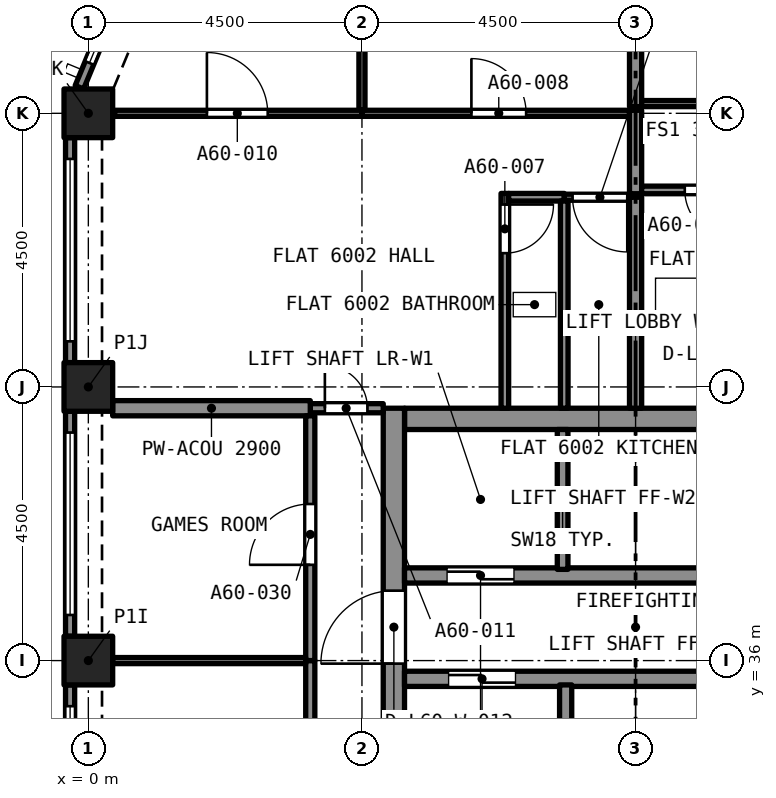
"""IFC4 building model, lengths in metres.
Left out: names, types, materials, properties, quantities, classifications, styles, units other than length and angle.
Written with IfcOpenShell. Run it as: python <this file> out.ifc"""

import sys

from ifc_helpers import new_model, si_unit, direction, frame, frame_2d, origin, origin_2d, place, context, subcontext, project, spatial, rectangle, extrude, element, fill, save


model = new_model("IFC4")
c1 = context("Model", 3, precision=1e-05, world=origin(), true_north=direction((0.0, 1.0)))
c2 = subcontext(c1, "Body", "Model", "MODEL_VIEW")
j1 = project(units=[si_unit("LENGTHUNIT", "METRE"), si_unit("PLANEANGLEUNIT", "RADIAN")], contexts=[c1])
p1 = place(None, origin())
s1 = spatial("IfcSite", under=j1, at=p1, CompositionType="ELEMENT")
p2 = place(p1, origin())
s2 = spatial("IfcBuilding", under=s1, at=p2, CompositionType="ELEMENT")
p3 = place(p2, frame((0.0, 0.0, 216.495)))
s3 = spatial("IfcBuildingStorey", under=s2, at=p3, CompositionType="ELEMENT", Elevation=216.495)
for number, where, z_axis, x_axis in (
    (1, (0.0, 36.0, 0.0), (0.0, 0.0, 1.0), (1.0, 0.0, 0.0)),
    (2, (0.0, 40.5, 0.0), (0.0, 0.0, 1.0), (1.0, 0.0, 0.0)),
    (3, (0.0, 45.0, 0.0), (0.0, 0.0, 1.0), (1.0, 0.0, 0.0)),
):
    element("IfcColumn", number, at=place(p3, frame(where, z_axis=z_axis, x_axis=x_axis)), inside=s3, PredefinedType="COLUMN", context=c2, shape_type="SweptSolid", body=[
        extrude(rectangle(XDim=0.8, YDim=0.8, at=origin_2d()), origin(), (0.0, 0.0, 1.0), 3.2),
    ])
p4 = place(p3, frame((5.2, 39.975, 0.0), z_axis=(0.0, 0.0, 1.0), x_axis=(1.0, 0.0, 0.0)))
e4 = element("IfcWall", 4, at=p4, inside=s3, PredefinedType="SOLIDWALL", context=c2, shape_type="SweptSolid", body=[
    extrude(rectangle(XDim=7.6, YDim=0.35, at=frame_2d((3.8, 0.0))), origin(), (0.0, 0.0, 1.0), 3.2),
])
p5 = place(p3, frame((5.025, 27.35, 0.0), z_axis=(0.0, 0.0, 1.0), x_axis=(0.0, 1.0, 0.0)))
e5 = element("IfcWall", 5, at=p5, inside=s3, PredefinedType="SOLIDWALL", context=c2, shape_type="SweptSolid", body=[
    extrude(rectangle(XDim=12.8, YDim=0.35, at=frame_2d((6.4, 0.0))), origin(), (0.0, 0.0, 1.0), 3.2),
])
p6 = place(p5, frame((8.6, 0.0, 0.0)))
e6 = element("IfcOpeningElement", 6, at=p6, cuts=e5, PredefinedType="OPENING", context=c2, shape_type="SweptSolid", body=[
    extrude(rectangle(XDim=1.2, YDim=2.1, at=frame_2d((0.6, 1.05))), frame((0.0, 0.185, 0.0), z_axis=(0.0, -1.0, 0.0), x_axis=(1.0, 0.0, 0.0)), (0.0, 0.0, 1.0), 0.37),
])
p7 = place(p3, frame((-0.147, 45.429, 0.0), z_axis=(0.0, 0.0, 1.0), x_axis=(0.382669406082, 0.923885342263, 0.0)))
e7 = element("IfcWall", 7, at=p7, inside=s3, PredefinedType="SOLIDWALL", context=c2, shape_type="SweptSolid", body=[
    extrude(rectangle(XDim=2.602, YDim=0.15, at=frame_2d((1.301, 0.0))), origin(), (0.0, 0.0, 1.0), 3.2),
])
p8 = place(p7, frame((0.432, 0.0, 0.45)))
e8 = element("IfcOpeningElement", 8, at=p8, cuts=e7, PredefinedType="OPENING", context=c2, shape_type="SweptSolid", body=[
    extrude(rectangle(XDim=1.9, YDim=1.95, at=frame_2d((0.95, 0.975))), frame((0.0, 0.085, 0.0), z_axis=(0.0, -1.0, 0.0), x_axis=(1.0, 0.0, 0.0)), (0.0, 0.0, 1.0), 0.17),
])
p9 = place(p3, frame((-0.3, 40.9, 0.0), z_axis=(0.0, 0.0, 1.0), x_axis=(0.0, 1.0, 0.0)))
e9 = element("IfcWall", 9, at=p9, inside=s3, PredefinedType="SOLIDWALL", context=c2, shape_type="SweptSolid", body=[
    extrude(rectangle(XDim=3.7, YDim=0.15, at=frame_2d((1.85, 0.0))), origin(), (0.0, 0.0, 1.0), 3.2),
])
p10 = place(p9, frame((0.35, 0.0, 0.45)))
e10 = element("IfcOpeningElement", 10, at=p10, cuts=e9, PredefinedType="OPENING", context=c2, shape_type="SweptSolid", body=[
    extrude(rectangle(XDim=3.0, YDim=1.95, at=frame_2d((1.5, 0.975))), frame((0.0, 0.085, 0.0), z_axis=(0.0, -1.0, 0.0), x_axis=(1.0, 0.0, 0.0)), (0.0, 0.0, 1.0), 0.17),
])
p11 = place(p3, frame((-0.3, 36.4, 0.0), z_axis=(0.0, 0.0, 1.0), x_axis=(0.0, 1.0, 0.0)))
e11 = element("IfcWall", 11, at=p11, inside=s3, PredefinedType="SOLIDWALL", context=c2, shape_type="SweptSolid", body=[
    extrude(rectangle(XDim=3.7, YDim=0.15, at=frame_2d((1.85, 0.0))), origin(), (0.0, 0.0, 1.0), 3.2),
])
p12 = place(p11, frame((0.35, 0.0, 0.45)))
e12 = element("IfcOpeningElement", 12, at=p12, cuts=e11, PredefinedType="OPENING", context=c2, shape_type="SweptSolid", body=[
    extrude(rectangle(XDim=3.0, YDim=1.95, at=frame_2d((1.5, 0.975))), frame((0.0, 0.085, 0.0), z_axis=(0.0, -1.0, 0.0), x_axis=(1.0, 0.0, 0.0)), (0.0, 0.0, 1.0), 0.17),
])
p13 = place(p3, frame((-0.3, 31.9, 0.0), z_axis=(0.0, 0.0, 1.0), x_axis=(0.0, 1.0, 0.0)))
e13 = element("IfcWall", 13, at=p13, inside=s3, PredefinedType="SOLIDWALL", context=c2, shape_type="SweptSolid", body=[
    extrude(rectangle(XDim=3.7, YDim=0.15, at=frame_2d((1.85, 0.0))), origin(), (0.0, 0.0, 1.0), 3.2),
])
p14 = place(p13, frame((0.35, 0.0, 0.45)))
e14 = element("IfcOpeningElement", 14, at=p14, cuts=e13, PredefinedType="OPENING", context=c2, shape_type="SweptSolid", body=[
    extrude(rectangle(XDim=3.0, YDim=1.95, at=frame_2d((1.5, 0.975))), frame((0.0, 0.085, 0.0), z_axis=(0.0, -1.0, 0.0), x_axis=(1.0, 0.0, 0.0)), (0.0, 0.0, 1.0), 0.17),
])
p15 = place(p3, frame((6.85, 43.683, 0.0), z_axis=(0.0, 0.0, 1.0), x_axis=(0.0, -1.0, 0.0)))
e15 = element("IfcWall", 15, at=p15, inside=s3, PredefinedType="PARTITIONING", context=c2, shape_type="SweptSolid", body=[
    extrude(rectangle(XDim=3.533, YDim=0.125, at=frame_2d((1.766, 0.0))), origin(), (0.0, 0.0, 1.0), 2.9),
])
p16 = place(p15, frame((0.183, 0.0, 0.0)))
e16 = element("IfcOpeningElement", 16, at=p16, cuts=e15, PredefinedType="OPENING", context=c2, shape_type="SweptSolid", body=[
    extrude(rectangle(XDim=0.8, YDim=2.1, at=frame_2d((0.4, 1.05))), frame((0.0, 0.073, 0.0), z_axis=(0.0, -1.0, 0.0), x_axis=(1.0, 0.0, 0.0)), (0.0, 0.0, 1.0), 0.145),
])
p17 = place(p3, frame((6.913, 43.62, 0.0), z_axis=(0.0, 0.0, 1.0), x_axis=(1.0, 0.0, 0.0)))
e17 = element("IfcWall", 17, at=p17, inside=s3, PredefinedType="PARTITIONING", context=c2, shape_type="SweptSolid", body=[
    extrude(rectangle(XDim=0.915, YDim=0.125, at=frame_2d((0.458, 0.0))), origin(), (0.0, 0.0, 1.0), 2.9),
])
p18 = place(p3, frame((7.827, 40.15, 0.0), z_axis=(0.0, 0.0, 1.0), x_axis=(0.0, 1.0, 0.0)))
e18 = element("IfcWall", 18, at=p18, inside=s3, PredefinedType="PARTITIONING", context=c2, shape_type="SweptSolid", body=[
    extrude(rectangle(XDim=3.408, YDim=0.125, at=frame_2d((1.704, 0.0))), origin(), (0.0, 0.0, 1.0), 2.9),
])
p19 = place(p3, frame((4.5, 45.0, 0.0), z_axis=(0.0, 0.0, 1.0), x_axis=(1.0, 0.0, 0.0)))
e19 = element("IfcWall", 19, at=p19, inside=s3, PredefinedType="PARTITIONING", context=c2, shape_type="SweptSolid", body=[
    extrude(rectangle(XDim=4.4, YDim=0.1, at=frame_2d((2.2, 0.0))), origin(), (0.0, 0.0, 1.0), 2.9),
])
p20 = place(p19, frame((1.8, 0.0, 0.0)))
e20 = element("IfcOpeningElement", 20, at=p20, cuts=e19, PredefinedType="OPENING", context=c2, shape_type="SweptSolid", body=[
    extrude(rectangle(XDim=0.9, YDim=2.1, at=frame_2d((0.45, 1.05))), frame((0.0, 0.06, 0.0), z_axis=(0.0, -1.0, 0.0), x_axis=(1.0, 0.0, 0.0)), (0.0, 0.0, 1.0), 0.12),
])
p21 = place(p3, frame((4.5, 45.05, 0.0), z_axis=(0.0, 0.0, 1.0), x_axis=(0.0, 1.0, 0.0)))
e21 = element("IfcWall", 21, at=p21, inside=s3, PredefinedType="PARTITIONING", context=c2, shape_type="SweptSolid", body=[
    extrude(rectangle(XDim=4.017, YDim=0.1, at=frame_2d((2.009, 0.0))), origin(), (0.0, 0.0, 1.0), 2.9),
])
p22 = place(p3, frame((9.0, 45.11, 0.0), z_axis=(0.0, 0.0, 1.0), x_axis=(0.0, 1.0, 0.0)))
e22 = element("IfcWall", 22, at=p22, inside=s3, PredefinedType="PARTITIONING", context=c2, shape_type="SweptSolid", body=[
    extrude(rectangle(XDim=3.99, YDim=0.2, at=frame_2d((1.995, 0.0))), origin(), (0.0, 0.0, 1.0), 2.9),
])
p23 = place(p3, frame((9.0, 43.62, 0.0), z_axis=(0.0, 0.0, 1.0), x_axis=(-1.0, 0.0, 0.0)))
e23 = element("IfcWall", 23, at=p23, inside=s3, PredefinedType="PARTITIONING", context=c2, shape_type="SweptSolid", body=[
    extrude(rectangle(XDim=1.173, YDim=0.1, at=frame_2d((0.586, 0.0))), origin(), (0.0, 0.0, 1.0), 2.9),
])
p24 = place(p23, frame((0.136, 0.0, 0.0)))
e24 = element("IfcOpeningElement", 24, at=p24, cuts=e23, PredefinedType="OPENING", context=c2, shape_type="SweptSolid", body=[
    extrude(rectangle(XDim=0.9, YDim=2.1, at=frame_2d((0.45, 1.05))), frame((0.0, 0.06, 0.0), z_axis=(0.0, -1.0, 0.0), x_axis=(1.0, 0.0, 0.0)), (0.0, 0.0, 1.0), 0.12),
])
p25 = place(p3, frame((0.433, 45.0, 0.0), z_axis=(0.0, 0.0, 1.0), x_axis=(1.0, 0.0, 0.0)))
e25 = element("IfcWall", 25, at=p25, inside=s3, PredefinedType="PARTITIONING", context=c2, shape_type="SweptSolid", body=[
    extrude(rectangle(XDim=4.067, YDim=0.1, at=frame_2d((2.034, 0.0))), origin(), (0.0, 0.0, 1.0), 2.9),
])
p26 = place(p25, frame((1.517, 0.0, 0.0)))
e26 = element("IfcOpeningElement", 26, at=p26, cuts=e25, PredefinedType="OPENING", context=c2, shape_type="SweptSolid", body=[
    extrude(rectangle(XDim=1.0, YDim=2.1, at=frame_2d((0.5, 1.05))), frame((0.0, 0.06, 0.0), z_axis=(0.0, -1.0, 0.0), x_axis=(1.0, 0.0, 0.0)), (0.0, 0.0, 1.0), 0.12),
])
p27 = place(p3, frame((9.0, 43.677, 0.0), z_axis=(0.0, 0.0, 1.0), x_axis=(0.0, 1.0, 0.0)))
e27 = element("IfcWall", 27, at=p27, inside=s3, PredefinedType="PARTITIONING", context=c2, shape_type="SweptSolid", body=[
    extrude(rectangle(XDim=1.373, YDim=0.2, at=frame_2d((0.686, 0.0))), origin(), (0.0, 0.0, 1.0), 2.9),
])
p28 = place(p3, frame((3.65, 40.15, 0.0), z_axis=(0.0, 0.0, 1.0), x_axis=(1.0, 0.0, 0.0)))
e28 = element("IfcWall", 28, at=p28, inside=s3, PredefinedType="PARTITIONING", context=c2, shape_type="SweptSolid", body=[
    extrude(rectangle(XDim=1.2, YDim=0.15, at=frame_2d((0.6, 0.0))), origin(), (0.0, 0.0, 1.0), 2.9),
])
p29 = place(p28, frame((0.24, 0.0, 0.0)))
e29 = element("IfcOpeningElement", 29, at=p29, cuts=e28, PredefinedType="OPENING", context=c2, shape_type="SweptSolid", body=[
    extrude(rectangle(XDim=0.7, YDim=2.1, at=frame_2d((0.35, 1.05))), frame((0.0, 0.085, 0.0), z_axis=(0.0, -1.0, 0.0), x_axis=(1.0, 0.0, 0.0)), (0.0, 0.0, 1.0), 0.17),
])
p30 = place(p3, frame((0.4, 40.15, 0.0), z_axis=(0.0, 0.0, 1.0), x_axis=(1.0, 0.0, 0.0)))
e30 = element("IfcWall", 30, at=p30, inside=s3, PredefinedType="PARTITIONING", context=c2, shape_type="SweptSolid", body=[
    extrude(rectangle(XDim=3.25, YDim=0.25, at=frame_2d((1.625, 0.0))), origin(), (0.0, 0.0, 1.0), 2.9),
])
p31 = place(p3, frame((9.0, 40.15, 0.0), z_axis=(0.0, 0.0, 1.0), x_axis=(0.0, 1.0, 0.0)))
e31 = element("IfcWall", 31, at=p31, inside=s3, PredefinedType="PARTITIONING", context=c2, shape_type="SweptSolid", body=[
    extrude(rectangle(XDim=3.47, YDim=0.2, at=frame_2d((1.735, 0.0))), origin(), (0.0, 0.0, 1.0), 2.9),
])
p32 = place(p3, frame((11.418, 43.74, 0.0), z_axis=(0.0, 0.0, 1.0), x_axis=(-1.0, 0.0, 0.0)))
e32 = element("IfcWall", 32, at=p32, inside=s3, PredefinedType="PARTITIONING", context=c2, shape_type="SweptSolid", body=[
    extrude(rectangle(XDim=2.318, YDim=0.125, at=frame_2d((1.159, 0.0))), origin(), (0.0, 0.0, 1.0), 2.9),
])
p33 = place(p32, frame((0.809, 0.0, 0.0)))
e33 = element("IfcOpeningElement", 33, at=p33, cuts=e32, PredefinedType="OPENING", context=c2, shape_type="SweptSolid", body=[
    extrude(rectangle(XDim=0.8, YDim=2.1, at=frame_2d((0.4, 1.05))), frame((0.0, 0.073, 0.0), z_axis=(0.0, -1.0, 0.0), x_axis=(1.0, 0.0, 0.0)), (0.0, 0.0, 1.0), 0.145),
])
p34 = place(p3, frame((9.1, 45.16, 0.0), z_axis=(0.0, 0.0, 1.0), x_axis=(1.0, 0.0, 0.0)))
e34 = element("IfcWall", 34, at=p34, inside=s3, PredefinedType="PARTITIONING", context=c2, shape_type="SweptSolid", body=[
    extrude(rectangle(XDim=4.4, YDim=0.1, at=frame_2d((2.2, 0.0))), origin(), (0.0, 0.0, 1.0), 2.9),
])
p35 = place(p34, frame((1.65, 0.0, 0.0)))
e35 = element("IfcOpeningElement", 35, at=p35, cuts=e34, PredefinedType="OPENING", context=c2, shape_type="SweptSolid", body=[
    extrude(rectangle(XDim=1.0, YDim=2.1, at=frame_2d((0.5, 1.05))), frame((0.0, 0.06, 0.0), z_axis=(0.0, -1.0, 0.0), x_axis=(1.0, 0.0, 0.0)), (0.0, 0.0, 1.0), 0.12),
])
p36 = place(p3, frame((3.65, 31.5, 0.0), z_axis=(0.0, 0.0, 1.0), x_axis=(0.0, 1.0, 0.0)))
e36 = element("IfcWall", 36, at=p36, inside=s3, PredefinedType="PARTITIONING", context=c2, shape_type="SweptSolid", body=[
    extrude(rectangle(XDim=4.5, YDim=0.15, at=frame_2d((2.25, 0.0))), origin(), (0.0, 0.0, 1.0), 2.9),
])
p37 = place(p36, frame((1.75, 0.0, 0.0)))
e37 = element("IfcOpeningElement", 37, at=p37, cuts=e36, PredefinedType="OPENING", context=c2, shape_type="SweptSolid", body=[
    extrude(rectangle(XDim=1.0, YDim=2.1, at=frame_2d((0.5, 1.05))), frame((0.0, 0.085, 0.0), z_axis=(0.0, -1.0, 0.0), x_axis=(1.0, 0.0, 0.0)), (0.0, 0.0, 1.0), 0.17),
])
p38 = place(p3, frame((3.65, 36.0, 0.0), z_axis=(0.0, 0.0, 1.0), x_axis=(0.0, 1.0, 0.0)))
e38 = element("IfcWall", 38, at=p38, inside=s3, PredefinedType="PARTITIONING", context=c2, shape_type="SweptSolid", body=[
    extrude(rectangle(XDim=4.025, YDim=0.15, at=frame_2d((2.012, 0.0))), origin(), (0.0, 0.0, 1.0), 2.9),
])
p39 = place(p38, frame((1.575, 0.0, 0.0)))
e39 = element("IfcOpeningElement", 39, at=p39, cuts=e38, PredefinedType="OPENING", context=c2, shape_type="SweptSolid", body=[
    extrude(rectangle(XDim=1.0, YDim=2.1, at=frame_2d((0.5, 1.05))), frame((0.0, 0.085, 0.0), z_axis=(0.0, -1.0, 0.0), x_axis=(1.0, 0.0, 0.0)), (0.0, 0.0, 1.0), 0.17),
])
p40 = place(p3, frame((0.4, 36.0, 0.0), z_axis=(0.0, 0.0, 1.0), x_axis=(1.0, 0.0, 0.0)))
e40 = element("IfcWall", 40, at=p40, inside=s3, PredefinedType="PARTITIONING", context=c2, shape_type="SweptSolid", body=[
    extrude(rectangle(XDim=3.175, YDim=0.1, at=frame_2d((1.587, 0.0))), origin(), (0.0, 0.0, 1.0), 2.9),
])
p41 = place(p3, frame((5.2, 35.7, 0.0), z_axis=(0.0, 0.0, 1.0), x_axis=(1.0, 0.0, 0.0)))
e41 = element("IfcWall", 41, at=p41, inside=s3, PredefinedType="SOLIDWALL", context=c2, shape_type="SweptSolid", body=[
    extrude(rectangle(XDim=7.6, YDim=0.25, at=frame_2d((3.8, 0.0))), origin(), (0.0, 0.0, 1.0), 2.9),
])
p42 = place(p41, frame((0.725, 0.0, 0.0)))
e42 = element("IfcOpeningElement", 42, at=p42, cuts=e41, PredefinedType="OPENING", context=c2, shape_type="SweptSolid", body=[
    extrude(rectangle(XDim=1.1, YDim=2.4, at=frame_2d((0.55, 1.2))), frame((0.0, 0.135, 0.0), z_axis=(0.0, -1.0, 0.0), x_axis=(1.0, 0.0, 0.0)), (0.0, 0.0, 1.0), 0.27),
])
p43 = place(p41, frame((5.875, 0.0, 0.0)))
e43 = element("IfcOpeningElement", 43, at=p43, cuts=e41, PredefinedType="OPENING", context=c2, shape_type="SweptSolid", body=[
    extrude(rectangle(XDim=0.9, YDim=2.1, at=frame_2d((0.45, 1.05))), frame((0.0, 0.135, 0.0), z_axis=(0.0, -1.0, 0.0), x_axis=(1.0, 0.0, 0.0)), (0.0, 0.0, 1.0), 0.27),
])
p44 = place(p3, frame((5.2, 37.4, 0.0), z_axis=(0.0, 0.0, 1.0), x_axis=(1.0, 0.0, 0.0)))
e44 = element("IfcWall", 44, at=p44, inside=s3, PredefinedType="SOLIDWALL", context=c2, shape_type="SweptSolid", body=[
    extrude(rectangle(XDim=7.6, YDim=0.25, at=frame_2d((3.8, 0.0))), origin(), (0.0, 0.0, 1.0), 2.9),
])
p45 = place(p44, frame((0.7, 0.0, 0.0)))
e45 = element("IfcOpeningElement", 45, at=p45, cuts=e44, PredefinedType="OPENING", context=c2, shape_type="SweptSolid", body=[
    extrude(rectangle(XDim=1.1, YDim=2.4, at=frame_2d((0.55, 1.2))), frame((0.0, 0.135, 0.0), z_axis=(0.0, -1.0, 0.0), x_axis=(1.0, 0.0, 0.0)), (0.0, 0.0, 1.0), 0.27),
])
p46 = place(p3, frame((7.85, 33.3, 0.0), z_axis=(0.0, 0.0, 1.0), x_axis=(0.0, 1.0, 0.0)))
e46 = element("IfcWall", 46, at=p46, inside=s3, PredefinedType="SOLIDWALL", context=c2, shape_type="SweptSolid", body=[
    extrude(rectangle(XDim=2.3, YDim=0.2, at=frame_2d((1.15, 0.0))), origin(), (0.0, 0.0, 1.0), 2.9),
])
p47 = place(p3, frame((7.8, 37.5, 0.0), z_axis=(0.0, 0.0, 1.0), x_axis=(0.0, 1.0, 0.0)))
e47 = element("IfcWall", 47, at=p47, inside=s3, PredefinedType="SOLIDWALL", context=c2, shape_type="SweptSolid", body=[
    extrude(rectangle(XDim=2.3, YDim=0.175, at=frame_2d((1.15, 0.0))), origin(), (0.0, 0.0, 1.0), 2.9),
])
p48 = place(p8, origin())
e48 = element("IfcWindow", 48, at=p48, inside=s3, PartitioningType="SINGLE_PANEL", PredefinedType="WINDOW", context=c2, shape_type="SweptSolid", body=[
    extrude(rectangle(XDim=1.9, YDim=1.95, at=frame_2d((0.95, 0.975))), frame((0.0, 0.03, 0.0), z_axis=(0.0, -1.0, 0.0), x_axis=(1.0, 0.0, 0.0)), (0.0, 0.0, 1.0), 0.06),
])
fill(e8, e48)
p49 = place(p10, origin())
e49 = element("IfcWindow", 49, at=p49, inside=s3, PartitioningType="SINGLE_PANEL", PredefinedType="WINDOW", context=c2, shape_type="SweptSolid", body=[
    extrude(rectangle(XDim=3.0, YDim=1.95, at=frame_2d((1.5, 0.975))), frame((0.0, 0.03, 0.0), z_axis=(0.0, -1.0, 0.0), x_axis=(1.0, 0.0, 0.0)), (0.0, 0.0, 1.0), 0.06),
])
fill(e10, e49)
p50 = place(p12, origin())
e50 = element("IfcWindow", 50, at=p50, inside=s3, PartitioningType="SINGLE_PANEL", PredefinedType="WINDOW", context=c2, shape_type="SweptSolid", body=[
    extrude(rectangle(XDim=3.0, YDim=1.95, at=frame_2d((1.5, 0.975))), frame((0.0, 0.03, 0.0), z_axis=(0.0, -1.0, 0.0), x_axis=(1.0, 0.0, 0.0)), (0.0, 0.0, 1.0), 0.06),
])
fill(e12, e50)
p51 = place(p14, origin())
e51 = element("IfcWindow", 51, at=p51, inside=s3, PartitioningType="SINGLE_PANEL", PredefinedType="WINDOW", context=c2, shape_type="SweptSolid", body=[
    extrude(rectangle(XDim=3.0, YDim=1.95, at=frame_2d((1.5, 0.975))), frame((0.0, 0.03, 0.0), z_axis=(0.0, -1.0, 0.0), x_axis=(1.0, 0.0, 0.0)), (0.0, 0.0, 1.0), 0.06),
])
fill(e14, e51)
p52 = place(p16, origin())
e52 = element("IfcDoor", 52, at=p52, inside=s3, OperationType="SINGLE_SWING_LEFT", PredefinedType="DOOR", context=c2, shape_type="SweptSolid", body=[
    extrude(rectangle(XDim=0.8, YDim=2.1, at=frame_2d((0.4, 1.05))), frame((0.0, 0.025, 0.0), z_axis=(0.0, -1.0, 0.0), x_axis=(1.0, 0.0, 0.0)), (0.0, 0.0, 1.0), 0.05),
])
fill(e16, e52)
p53 = place(p20, origin())
e53 = element("IfcDoor", 53, at=p53, inside=s3, OperationType="SINGLE_SWING_RIGHT", PredefinedType="DOOR", context=c2, shape_type="SweptSolid", body=[
    extrude(rectangle(XDim=0.9, YDim=2.1, at=frame_2d((0.45, 1.05))), frame((0.0, 0.025, 0.0), z_axis=(0.0, -1.0, 0.0), x_axis=(1.0, 0.0, 0.0)), (0.0, 0.0, 1.0), 0.05),
])
fill(e20, e53)
p54 = place(p24, origin())
e54 = element("IfcDoor", 54, at=p54, inside=s3, OperationType="SINGLE_SWING_RIGHT", PredefinedType="DOOR", context=c2, shape_type="SweptSolid", body=[
    extrude(rectangle(XDim=0.9, YDim=2.1, at=frame_2d((0.45, 1.05))), frame((0.0, 0.025, 0.0), z_axis=(0.0, -1.0, 0.0), x_axis=(1.0, 0.0, 0.0)), (0.0, 0.0, 1.0), 0.05),
])
fill(e24, e54)
p55 = place(p26, origin())
e55 = element("IfcDoor", 55, at=p55, inside=s3, OperationType="SINGLE_SWING_LEFT", PredefinedType="DOOR", context=c2, shape_type="SweptSolid", body=[
    extrude(rectangle(XDim=1.0, YDim=2.1, at=frame_2d((0.5, 1.05))), frame((0.0, 0.025, 0.0), z_axis=(0.0, -1.0, 0.0), x_axis=(1.0, 0.0, 0.0)), (0.0, 0.0, 1.0), 0.05),
])
fill(e26, e55)
p56 = place(p29, origin())
e56 = element("IfcDoor", 56, at=p56, inside=s3, OperationType="SINGLE_SWING_LEFT", PredefinedType="DOOR", context=c2, shape_type="SweptSolid", body=[
    extrude(rectangle(XDim=0.7, YDim=2.1, at=frame_2d((0.35, 1.05))), frame((0.0, 0.025, 0.0), z_axis=(0.0, -1.0, 0.0), x_axis=(1.0, 0.0, 0.0)), (0.0, 0.0, 1.0), 0.05),
])
fill(e29, e56)
p57 = place(p33, origin())
e57 = element("IfcDoor", 57, at=p57, inside=s3, OperationType="SINGLE_SWING_RIGHT", PredefinedType="DOOR", context=c2, shape_type="SweptSolid", body=[
    extrude(rectangle(XDim=0.8, YDim=2.1, at=frame_2d((0.4, 1.05))), frame((0.0, 0.025, 0.0), z_axis=(0.0, -1.0, 0.0), x_axis=(1.0, 0.0, 0.0)), (0.0, 0.0, 1.0), 0.05),
])
fill(e33, e57)
p58 = place(p39, origin())
e58 = element("IfcDoor", 58, at=p58, inside=s3, OperationType="SINGLE_SWING_RIGHT", PredefinedType="DOOR", context=c2, shape_type="SweptSolid", body=[
    extrude(rectangle(XDim=1.0, YDim=2.1, at=frame_2d((0.5, 1.05))), frame((0.0, 0.025, 0.0), z_axis=(0.0, -1.0, 0.0), x_axis=(1.0, 0.0, 0.0)), (0.0, 0.0, 1.0), 0.05),
])
fill(e39, e58)
p59 = place(p45, origin())
e59 = element("IfcDoor", 59, at=p59, inside=s3, OperationType="SLIDING_TO_LEFT", PredefinedType="DOOR", context=c2, shape_type="SweptSolid", body=[
    extrude(rectangle(XDim=1.1, YDim=2.4, at=frame_2d((0.55, 1.2))), frame((0.0, 0.025, 0.0), z_axis=(0.0, -1.0, 0.0), x_axis=(1.0, 0.0, 0.0)), (0.0, 0.0, 1.0), 0.05),
])
fill(e45, e59)
p60 = place(p42, origin())
e60 = element("IfcDoor", 60, at=p60, inside=s3, OperationType="SLIDING_TO_LEFT", PredefinedType="DOOR", context=c2, shape_type="SweptSolid", body=[
    extrude(rectangle(XDim=1.1, YDim=2.4, at=frame_2d((0.55, 1.2))), frame((0.0, 0.025, 0.0), z_axis=(0.0, -1.0, 0.0), x_axis=(1.0, 0.0, 0.0)), (0.0, 0.0, 1.0), 0.05),
])
fill(e42, e60)
p61 = place(p6, origin())
e61 = element("IfcDoor", 61, at=p61, inside=s3, OperationType="SINGLE_SWING_LEFT", PredefinedType="DOOR", context=c2, shape_type="SweptSolid", body=[
    extrude(rectangle(XDim=1.2, YDim=2.1, at=frame_2d((0.6, 1.05))), frame((0.0, 0.025, 0.0), z_axis=(0.0, -1.0, 0.0), x_axis=(1.0, 0.0, 0.0)), (0.0, 0.0, 1.0), 0.05),
])
fill(e6, e61)
save(model, sys.argv[1])
